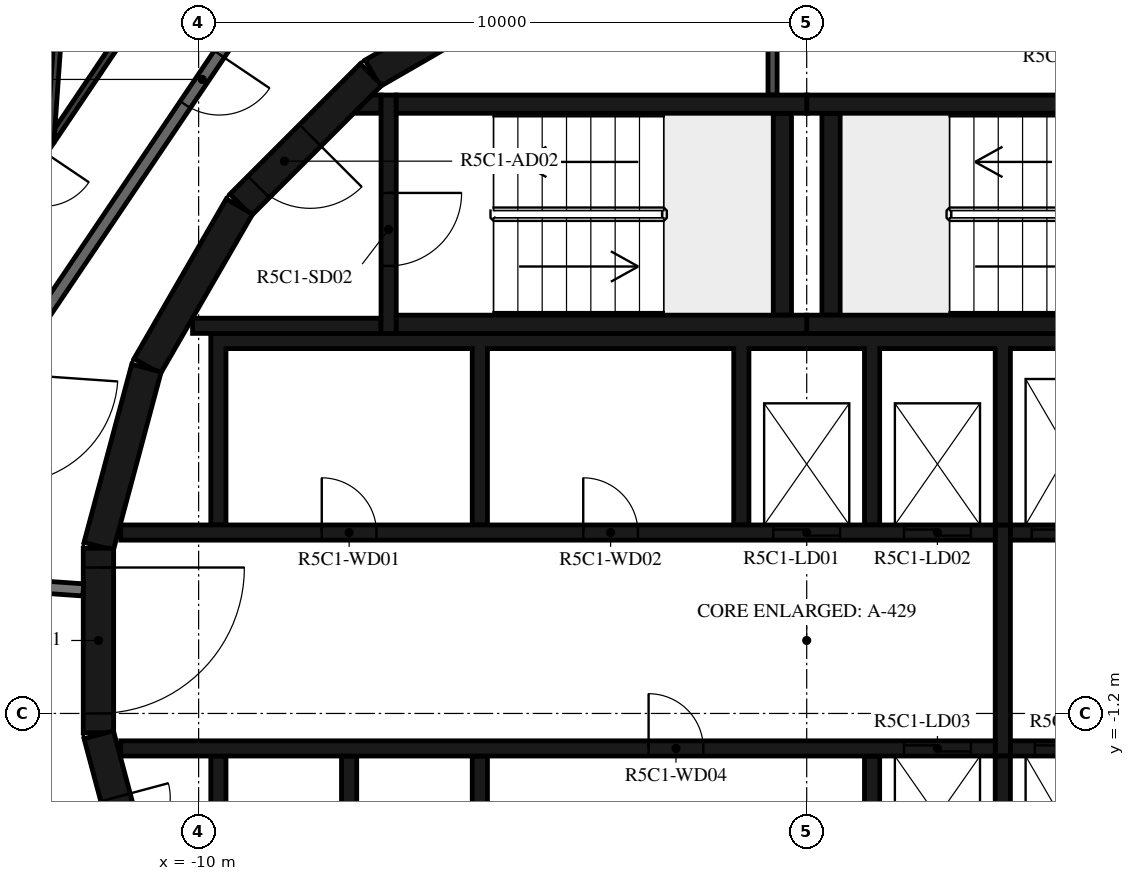
"""IFC4 building model, lengths in metres.
Left out: names, types, materials, properties, quantities, classifications, styles, units other than length and angle.
Written with IfcOpenShell. Run it as: python <this file> out.ifc"""

import sys

from ifc_helpers import new_model, si_unit, direction, frame, frame_2d, origin, place, context, subcontext, project, spatial, polyline, rectangle, outline, extrude, element, fill, save


model = new_model("IFC4")
c1 = context("Model", 3, precision=1e-05, world=origin(), true_north=direction((0.0, 1.0)))
c2 = subcontext(c1, "Body", "Model", "MODEL_VIEW")
j1 = project(units=[si_unit("LENGTHUNIT", "METRE"), si_unit("PLANEANGLEUNIT", "RADIAN")], contexts=[c1])
p1 = place(None, origin())
s1 = spatial("IfcSite", under=j1, at=p1, CompositionType="ELEMENT")
p2 = place(p1, origin())
s2 = spatial("IfcBuilding", under=s1, at=p2, CompositionType="ELEMENT")
p3 = place(p2, frame((0.0, 0.0, 212.9)))
s3 = spatial("IfcBuildingStorey", under=s2, at=p3, CompositionType="ELEMENT", Elevation=212.9)
p4 = place(p3, frame((-4.51, 10.845, 0.0), z_axis=(0.0, 0.0, 1.0), x_axis=(-0.865975092491, -0.500087131594, 0.0)))
e1 = element("IfcWall", 1, at=p4, inside=s3, PredefinedType="SHEAR", context=c2, shape_type="SweptSolid", body=[
    extrude(rectangle(XDim=3.033, YDim=0.5, at=frame_2d((1.516, 0.0))), origin(), (0.0, 0.0, 1.0), 3.12),
])
p5 = place(p3, frame((-7.164, 9.308, 0.0), z_axis=(0.0, 0.0, 1.0), x_axis=(-0.707106781187, -0.707106781187, 0.0)))
e2 = element("IfcWall", 2, at=p5, inside=s3, PredefinedType="SHEAR", context=c2, shape_type="SweptSolid", body=[
    extrude(rectangle(XDim=3.032, YDim=0.5, at=frame_2d((1.516, 0.0))), origin(), (0.0, 0.0, 1.0), 3.12),
])
p6 = place(p5, frame((1.416, 0.0, 0.0)))
e3 = element("IfcOpeningElement", 3, at=p6, cuts=e2, PredefinedType="OPENING", context=c2, shape_type="SweptSolid", body=[
    extrude(rectangle(XDim=1.2, YDim=2.1, at=frame_2d((0.6, 1.05))), frame((0.0, 0.26, 0.0), z_axis=(0.0, -1.0, 0.0), x_axis=(1.0, 0.0, 0.0)), (0.0, 0.0, 1.0), 0.52),
])
for number, where, z_axis, x_axis in (
    (4, (-9.329, 7.137, 0.0), (0.0, 0.0, 1.0), (-0.5, -0.866, 0.0)),
    (5, (-10.858, 4.479, 0.0), (0.0, 0.0, 1.0), (-0.259, -0.966, 0.0)),
):
    element("IfcWall", number, at=place(p3, frame(where, z_axis=z_axis, x_axis=x_axis)), inside=s3, PredefinedType="SHEAR", context=c2, shape_type="SweptSolid", body=[
        extrude(rectangle(XDim=3.033, YDim=0.5, at=frame_2d((1.516, 0.0))), origin(), (0.0, 0.0, 1.0), 3.12),
    ])
p7 = place(p3, frame((-11.647, 1.516, 0.0), z_axis=(0.0, 0.0, 1.0), x_axis=(0.0, -1.0, 0.0)))
e6 = element("IfcWall", 6, at=p7, inside=s3, PredefinedType="SHEAR", context=c2, shape_type="SweptSolid", body=[
    extrude(rectangle(XDim=3.033, YDim=0.5, at=frame_2d((1.516, 0.0))), origin(), (0.0, 0.0, 1.0), 3.12),
])
p8 = place(p7, frame((0.316, 0.0, 0.0)))
e7 = element("IfcOpeningElement", 7, at=p8, cuts=e6, PredefinedType="OPENING", context=c2, shape_type="SweptSolid", body=[
    extrude(rectangle(XDim=2.4, YDim=2.1, at=frame_2d((1.2, 1.05))), frame((0.0, 0.26, 0.0), z_axis=(0.0, -1.0, 0.0), x_axis=(1.0, 0.0, 0.0)), (0.0, 0.0, 1.0), 0.52),
])
p9 = place(p3, frame((-11.643, -1.55, 0.0), z_axis=(0.0, 0.0, 1.0), x_axis=(0.258734743916, -0.965948410781, 0.0)))
e8 = element("IfcWall", 8, at=p9, inside=s3, PredefinedType="SHEAR", context=c2, shape_type="SweptSolid", body=[
    extrude(rectangle(XDim=3.033, YDim=0.5, at=frame_2d((1.516, 0.0))), origin(), (0.0, 0.0, 1.0), 3.12),
])
p10 = place(p9, frame((1.066, 0.0, 0.0)))
e9 = element("IfcOpeningElement", 9, at=p10, cuts=e8, PredefinedType="OPENING", context=c2, shape_type="SweptSolid", body=[
    extrude(rectangle(XDim=0.9, YDim=2.1, at=frame_2d((0.45, 1.05))), frame((0.0, 0.26, 0.0), z_axis=(0.0, -1.0, 0.0), x_axis=(1.0, 0.0, 0.0)), (0.0, 0.0, 1.0), 0.52),
])
for number, where, z_axis, x_axis in (
    (10, (0.0, 5.2, 0.0), (0.0, 0.0, 1.0), (1.0, 0.0, 0.0)),
    (11, (0.0, 8.82, 0.0), (0.0, 0.0, 1.0), (1.0, 0.0, 0.0)),
):
    element("IfcWall", number, at=place(p3, frame(where, z_axis=z_axis, x_axis=x_axis)), inside=s3, PredefinedType="SHEAR", context=c2, shape_type="SweptSolid", body=[
        extrude(rectangle(XDim=6.75, YDim=0.3, at=frame_2d((3.375, 0.0))), origin(), (0.0, 0.0, 1.0), 3.12),
    ])
p11 = place(p3, frame((0.4, 5.35, 0.0), z_axis=(0.0, 0.0, 1.0), x_axis=(0.0, 1.0, 0.0)))
e12 = element("IfcWall", 12, at=p11, inside=s3, PredefinedType="SHEAR", context=c2, shape_type="SweptSolid", body=[
    extrude(rectangle(XDim=3.32, YDim=0.3, at=frame_2d((1.66, 0.0))), origin(), (0.0, 0.0, 1.0), 3.12),
])
for number, where, z_axis, x_axis in (
    (13, (-6.75, 5.2, 0.0), (0.0, 0.0, 1.0), (1.0, 0.0, 0.0)),
    (14, (-6.75, 8.82, 0.0), (0.0, 0.0, 1.0), (1.0, 0.0, 0.0)),
):
    element("IfcWall", number, at=place(p3, frame(where, z_axis=z_axis, x_axis=x_axis)), inside=s3, PredefinedType="SHEAR", context=c2, shape_type="SweptSolid", body=[
        extrude(rectangle(XDim=6.75, YDim=0.3, at=frame_2d((3.375, 0.0))), origin(), (0.0, 0.0, 1.0), 3.12),
    ])
p12 = place(p3, frame((-0.4, 5.35, 0.0), z_axis=(0.0, 0.0, 1.0), x_axis=(0.0, 1.0, 0.0)))
e15 = element("IfcWall", 15, at=p12, inside=s3, PredefinedType="SHEAR", context=c2, shape_type="SweptSolid", body=[
    extrude(rectangle(XDim=3.32, YDim=0.3, at=frame_2d((1.66, 0.0))), origin(), (0.0, 0.0, 1.0), 3.12),
])
p13 = place(p3, frame((-6.875, 8.97, 0.0), z_axis=(0.0, 0.0, 1.0), x_axis=(0.0, -1.0, 0.0)))
e16 = element("IfcWall", 16, at=p13, inside=s3, PredefinedType="SHEAR", context=c2, shape_type="SweptSolid", body=[
    extrude(rectangle(XDim=3.92, YDim=0.25, at=frame_2d((1.96, 0.0))), origin(), (0.0, 0.0, 1.0), 3.12),
])
p14 = place(p13, frame((1.61, 0.0, 0.0)))
e17 = element("IfcOpeningElement", 17, at=p14, cuts=e16, PredefinedType="OPENING", context=c2, shape_type="SweptSolid", body=[
    extrude(rectangle(XDim=1.2, YDim=2.1, at=frame_2d((0.6, 1.05))), frame((0.0, 0.135, 0.0), z_axis=(0.0, -1.0, 0.0), x_axis=(1.0, 0.0, 0.0)), (0.0, 0.0, 1.0), 0.27),
])
p15 = place(p3, frame((-7.0, 5.175, 0.0), z_axis=(0.0, 0.0, 1.0), x_axis=(-1.0, 0.0, 0.0)))
e18 = element("IfcWall", 18, at=p15, inside=s3, PredefinedType="SHEAR", context=c2, shape_type="SweptSolid", body=[
    extrude(rectangle(XDim=3.1, YDim=0.25, at=frame_2d((1.55, 0.0))), origin(), (0.0, 0.0, 1.0), 3.12),
])
p16 = place(p3, origin())
e19 = element("IfcWall", 19, at=p16, inside=s3, PredefinedType="SHEAR", context=c2, shape_type="SweptSolid", body=[
    extrude(outline(polyline([(-7.148, 8.97), (-7.0, 8.97), (-7.0, 8.67), (-7.448, 8.67), (-7.148, 8.97)])), origin(), (0.0, 0.0, 1.0), 3.12),
])
p17 = place(p3, origin())
e20 = element("IfcWall", 20, at=p17, inside=s3, PredefinedType="SHEAR", context=c2, shape_type="SweptSolid", body=[
    extrude(outline(polyline([(-9.55, 4.8), (-5.5, 4.8), (-5.5, 1.9), (-5.25, 1.9), (-5.25, 4.8), (-1.2, 4.8), (-1.2, 1.9), (-0.95, 1.9), (-0.95, 4.8), (0.95, 4.8), (0.95, 1.9), (1.2, 1.9), (1.2, 4.8), (3.1, 4.8), (3.1, 1.9), (3.35, 1.9), (3.35, 4.8), (5.25, 4.8), (5.25, 1.9), (5.5, 1.9), (5.5, 4.8), (7.4, 4.8), (7.4, 1.9), (7.65, 1.9), (7.65, 4.8), (9.55, 4.8), (9.55, 1.9), (9.8, 1.9), (9.8, 4.8), (9.8, 5.05), (-9.8, 5.05), (-9.8, 4.8), (-9.8, 1.9), (-9.55, 1.9), (-9.55, 4.8)])), origin(), (0.0, 0.0, 1.0), 3.12),
])
p18 = place(p3, origin())
e21 = element("IfcWall", 21, at=p18, inside=s3, PredefinedType="SHEAR", context=c2, shape_type="SweptSolid", body=[
    extrude(outline(polyline([(9.8, -5.05), (9.8, -4.8), (9.8, -1.9), (9.55, -1.9), (9.55, -4.8), (7.65, -4.8), (7.65, -1.9), (7.4, -1.9), (7.4, -4.8), (5.5, -4.8), (5.5, -1.9), (5.25, -1.9), (5.25, -4.8), (3.35, -4.8), (3.35, -1.9), (3.1, -1.9), (3.1, -4.8), (1.2, -4.8), (1.2, -1.9), (0.95, -1.9), (0.95, -4.8), (-5.25, -4.8), (-5.25, -1.9), (-5.5, -1.9), (-5.5, -4.8), (-7.4, -4.8), (-7.4, -1.9), (-7.65, -1.9), (-7.65, -4.8), (-9.55, -4.8), (-9.55, -1.9), (-9.8, -1.9), (-9.8, -4.8), (-9.8, -5.05), (9.8, -5.05)])), origin(), (0.0, 0.0, 1.0), 3.12),
])
p19 = place(p3, frame((-11.28, 1.775, 0.0), z_axis=(0.0, 0.0, 1.0), x_axis=(1.0, 0.0, 0.0)))
e22 = element("IfcWall", 22, at=p19, inside=s3, PredefinedType="SHEAR", context=c2, shape_type="SweptSolid", body=[
    extrude(rectangle(XDim=14.38, YDim=0.25, at=frame_2d((7.19, 0.0))), origin(), (0.0, 0.0, 1.0), 3.12),
])
p20 = place(p19, frame((10.73, 0.0, 0.0)))
e23 = element("IfcOpeningElement", 23, at=p20, cuts=e22, PredefinedType="OPENING", context=c2, shape_type="SweptSolid", body=[
    extrude(rectangle(XDim=1.1, YDim=2.1, at=frame_2d((0.55, 1.05))), frame((0.0, 0.135, 0.0), z_axis=(0.0, -1.0, 0.0), x_axis=(1.0, 0.0, 0.0)), (0.0, 0.0, 1.0), 0.27),
])
p21 = place(p19, frame((12.88, 0.0, 0.0)))
e24 = element("IfcOpeningElement", 24, at=p21, cuts=e22, PredefinedType="OPENING", context=c2, shape_type="SweptSolid", body=[
    extrude(rectangle(XDim=1.1, YDim=2.1, at=frame_2d((0.55, 1.05))), frame((0.0, 0.135, 0.0), z_axis=(0.0, -1.0, 0.0), x_axis=(1.0, 0.0, 0.0)), (0.0, 0.0, 1.0), 0.27),
])
p22 = place(p19, frame((3.305, 0.0, 0.0)))
e25 = element("IfcOpeningElement", 25, at=p22, cuts=e22, PredefinedType="OPENING", context=c2, shape_type="SweptSolid", body=[
    extrude(rectangle(XDim=0.9, YDim=2.1, at=frame_2d((0.45, 1.05))), frame((0.0, 0.135, 0.0), z_axis=(0.0, -1.0, 0.0), x_axis=(1.0, 0.0, 0.0)), (0.0, 0.0, 1.0), 0.27),
])
p23 = place(p19, frame((7.605, 0.0, 0.0)))
e26 = element("IfcOpeningElement", 26, at=p23, cuts=e22, PredefinedType="OPENING", context=c2, shape_type="SweptSolid", body=[
    extrude(rectangle(XDim=0.9, YDim=2.1, at=frame_2d((0.45, 1.05))), frame((0.0, 0.135, 0.0), z_axis=(0.0, -1.0, 0.0), x_axis=(1.0, 0.0, 0.0)), (0.0, 0.0, 1.0), 0.27),
])
p24 = place(p3, frame((3.35, 1.775, 0.0), z_axis=(0.0, 0.0, 1.0), x_axis=(1.0, 0.0, 0.0)))
e27 = element("IfcWall", 27, at=p24, inside=s3, PredefinedType="SHEAR", context=c2, shape_type="SweptSolid", body=[
    extrude(rectangle(XDim=7.93, YDim=0.25, at=frame_2d((3.965, 0.0))), origin(), (0.0, 0.0, 1.0), 3.12),
])
p25 = place(p24, frame((0.35, 0.0, 0.0)))
e28 = element("IfcOpeningElement", 28, at=p25, cuts=e27, PredefinedType="OPENING", context=c2, shape_type="SweptSolid", body=[
    extrude(rectangle(XDim=1.2, YDim=2.4, at=frame_2d((0.6, 1.2))), frame((0.0, 0.135, 0.0), z_axis=(0.0, -1.0, 0.0), x_axis=(1.0, 0.0, 0.0)), (0.0, 0.0, 1.0), 0.27),
])
p26 = place(p24, frame((2.5, 0.0, 0.0)))
e29 = element("IfcOpeningElement", 29, at=p26, cuts=e27, PredefinedType="OPENING", context=c2, shape_type="SweptSolid", body=[
    extrude(rectangle(XDim=1.2, YDim=2.4, at=frame_2d((0.6, 1.2))), frame((0.0, 0.135, 0.0), z_axis=(0.0, -1.0, 0.0), x_axis=(1.0, 0.0, 0.0)), (0.0, 0.0, 1.0), 0.27),
])
p27 = place(p24, frame((4.8, 0.0, 0.0)))
e30 = element("IfcOpeningElement", 30, at=p27, cuts=e27, PredefinedType="OPENING", context=c2, shape_type="SweptSolid", body=[
    extrude(rectangle(XDim=0.9, YDim=2.1, at=frame_2d((0.45, 1.05))), frame((0.0, 0.135, 0.0), z_axis=(0.0, -1.0, 0.0), x_axis=(1.0, 0.0, 0.0)), (0.0, 0.0, 1.0), 0.27),
])
p28 = place(p3, frame((-11.28, -1.775, 0.0), z_axis=(0.0, 0.0, 1.0), x_axis=(1.0, 0.0, 0.0)))
e31 = element("IfcWall", 31, at=p28, inside=s3, PredefinedType="SHEAR", context=c2, shape_type="SweptSolid", body=[
    extrude(rectangle(XDim=14.38, YDim=0.25, at=frame_2d((7.19, 0.0))), origin(), (0.0, 0.0, 1.0), 3.12),
])
p29 = place(p28, frame((12.88, 0.0, 0.0)))
e32 = element("IfcOpeningElement", 32, at=p29, cuts=e31, PredefinedType="OPENING", context=c2, shape_type="SweptSolid", body=[
    extrude(rectangle(XDim=1.1, YDim=2.1, at=frame_2d((0.55, 1.05))), frame((0.0, 0.135, 0.0), z_axis=(0.0, -1.0, 0.0), x_axis=(1.0, 0.0, 0.0)), (0.0, 0.0, 1.0), 0.27),
])
p30 = place(p28, frame((8.68, 0.0, 0.0)))
e33 = element("IfcOpeningElement", 33, at=p30, cuts=e31, PredefinedType="OPENING", context=c2, shape_type="SweptSolid", body=[
    extrude(rectangle(XDim=0.9, YDim=2.1, at=frame_2d((0.45, 1.05))), frame((0.0, 0.135, 0.0), z_axis=(0.0, -1.0, 0.0), x_axis=(1.0, 0.0, 0.0)), (0.0, 0.0, 1.0), 0.27),
])
p31 = place(p3, frame((3.35, -1.775, 0.0), z_axis=(0.0, 0.0, 1.0), x_axis=(1.0, 0.0, 0.0)))
e34 = element("IfcWall", 34, at=p31, inside=s3, PredefinedType="SHEAR", context=c2, shape_type="SweptSolid", body=[
    extrude(rectangle(XDim=7.93, YDim=0.25, at=frame_2d((3.965, 0.0))), origin(), (0.0, 0.0, 1.0), 3.12),
])
p32 = place(p31, frame((0.4, 0.0, 0.0)))
e35 = element("IfcOpeningElement", 35, at=p32, cuts=e34, PredefinedType="OPENING", context=c2, shape_type="SweptSolid", body=[
    extrude(rectangle(XDim=1.1, YDim=2.4, at=frame_2d((0.55, 1.2))), frame((0.0, 0.135, 0.0), z_axis=(0.0, -1.0, 0.0), x_axis=(1.0, 0.0, 0.0)), (0.0, 0.0, 1.0), 0.27),
])
p33 = place(p31, frame((2.55, 0.0, 0.0)))
e36 = element("IfcOpeningElement", 36, at=p33, cuts=e34, PredefinedType="OPENING", context=c2, shape_type="SweptSolid", body=[
    extrude(rectangle(XDim=1.1, YDim=2.4, at=frame_2d((0.55, 1.2))), frame((0.0, 0.135, 0.0), z_axis=(0.0, -1.0, 0.0), x_axis=(1.0, 0.0, 0.0)), (0.0, 0.0, 1.0), 0.27),
])
p34 = place(p31, frame((4.7, 0.0, 0.0)))
e37 = element("IfcOpeningElement", 37, at=p34, cuts=e34, PredefinedType="OPENING", context=c2, shape_type="SweptSolid", body=[
    extrude(rectangle(XDim=1.1, YDim=2.4, at=frame_2d((0.55, 1.2))), frame((0.0, 0.135, 0.0), z_axis=(0.0, -1.0, 0.0), x_axis=(1.0, 0.0, 0.0)), (0.0, 0.0, 1.0), 0.27),
])
p35 = place(p3, frame((3.225, -1.9, 0.0), z_axis=(0.0, 0.0, 1.0), x_axis=(0.0, 1.0, 0.0)))
e38 = element("IfcWall", 38, at=p35, inside=s3, PredefinedType="SHEAR", context=c2, shape_type="SweptSolid", body=[
    extrude(rectangle(XDim=3.8, YDim=0.25, at=frame_2d((1.9, 0.0))), origin(), (0.0, 0.0, 1.0), 3.12),
])
p36 = place(p3, frame((-0.562, 8.97, 0.0), z_axis=(0.0, 0.0, 1.0), x_axis=(0.0, 1.0, 0.0)))
e39 = element("IfcWall", 39, at=p36, inside=s3, PredefinedType="PARTITIONING", context=c2, shape_type="SweptSolid", body=[
    extrude(rectangle(XDim=2.427, YDim=0.15, at=frame_2d((1.214, 0.0))), origin(), (0.0, 0.0, 1.0), 3.12),
])
p37 = place(p36, frame((0.764, 0.0, 0.0)))
e40 = element("IfcOpeningElement", 40, at=p37, cuts=e39, PredefinedType="OPENING", context=c2, shape_type="SweptSolid", body=[
    extrude(rectangle(XDim=0.9, YDim=2.1, at=frame_2d((0.45, 1.05))), frame((0.0, 0.085, 0.0), z_axis=(0.0, -1.0, 0.0), x_axis=(1.0, 0.0, 0.0)), (0.0, 0.0, 1.0), 0.17),
])
p38 = place(p3, frame((-13.367, 0.935, 0.0), z_axis=(0.0, 0.0, 1.0), x_axis=(0.997553656289, -0.069904955655, 0.0)))
e41 = element("IfcWall", 41, at=p38, inside=s3, PredefinedType="STANDARD", context=c2, shape_type="SweptSolid", body=[
    extrude(rectangle(XDim=1.474, YDim=0.2, at=frame_2d((0.737, 0.0))), origin(), (0.0, 0.0, 1.0), 3.12),
])
p39 = place(p3, frame((-9.101, 10.47, 0.0), z_axis=(0.0, 0.0, 1.0), x_axis=(-0.559195469534, -0.829035841718, 0.0)))
e42 = element("IfcWall", 42, at=p39, inside=s3, PredefinedType="STANDARD", context=c2, shape_type="SweptSolid", body=[
    extrude(rectangle(XDim=7.181, YDim=0.2, at=frame_2d((3.591, 0.0))), origin(), (0.0, 0.0, 1.0), 3.12),
])
p40 = place(p39, frame((1.0, 0.0, 0.0)))
e43 = element("IfcOpeningElement", 43, at=p40, cuts=e42, PredefinedType="OPENING", context=c2, shape_type="SweptSolid", body=[
    extrude(rectangle(XDim=1.0, YDim=2.1, at=frame_2d((0.5, 1.05))), frame((0.0, 0.11, 0.0), z_axis=(0.0, -1.0, 0.0), x_axis=(1.0, 0.0, 0.0)), (0.0, 0.0, 1.0), 0.22),
])
p41 = place(p3, frame((-10.12, 11.642, 0.0), z_axis=(0.0, 0.0, 1.0), x_axis=(-0.55920080659, -0.829032241779, 0.0)))
e44 = element("IfcWall", 44, at=p41, inside=s3, PredefinedType="PARTITIONING", context=c2, shape_type="SweptSolid", body=[
    extrude(rectangle(XDim=7.985, YDim=0.12, at=frame_2d((3.992, 0.0))), origin(), (0.0, 0.0, 1.0), 3.12),
])
p42 = place(p41, frame((4.346, 0.0, 0.0)))
e45 = element("IfcOpeningElement", 45, at=p42, cuts=e44, PredefinedType="OPENING", context=c2, shape_type="SweptSolid", body=[
    extrude(rectangle(XDim=0.9, YDim=2.1, at=frame_2d((0.45, 1.05))), frame((0.0, 0.07, 0.0), z_axis=(0.0, -1.0, 0.0), x_axis=(1.0, 0.0, 0.0)), (0.0, 0.0, 1.0), 0.14),
])
p43 = place(p3, frame((-12.439, 8.204, 0.0), z_axis=(0.0, 0.0, 1.0), x_axis=(0.069750037523, 0.997564500303, 0.0)))
e46 = element("IfcWall", 46, at=p43, inside=s3, PredefinedType="PARTITIONING", context=c2, shape_type="SweptSolid", body=[
    extrude(rectangle(XDim=10.014, YDim=0.12, at=frame_2d((5.007, 0.0))), origin(), (0.0, 0.0, 1.0), 3.12),
])
p44 = place(p43, frame((1.859, 0.0, 0.0)))
e47 = element("IfcOpeningElement", 47, at=p44, cuts=e46, PredefinedType="OPENING", context=c2, shape_type="SweptSolid", body=[
    extrude(rectangle(XDim=0.9, YDim=2.1, at=frame_2d((0.45, 1.05))), frame((0.0, 0.07, 0.0), z_axis=(0.0, -1.0, 0.0), x_axis=(1.0, 0.0, 0.0)), (0.0, 0.0, 1.0), 0.14),
])
p45 = place(p14, origin())
e48 = element("IfcDoor", 48, at=p45, inside=s3, OperationType="SINGLE_SWING_LEFT", PredefinedType="DOOR", context=c2, shape_type="SweptSolid", body=[
    extrude(rectangle(XDim=1.2, YDim=2.1, at=frame_2d((0.6, 1.05))), frame((0.0, 0.025, 0.0), z_axis=(0.0, -1.0, 0.0), x_axis=(1.0, 0.0, 0.0)), (0.0, 0.0, 1.0), 0.05),
])
fill(e17, e48)
p46 = place(p6, origin())
e49 = element("IfcDoor", 49, at=p46, inside=s3, OperationType="SINGLE_SWING_RIGHT", PredefinedType="DOOR", context=c2, shape_type="SweptSolid", body=[
    extrude(rectangle(XDim=1.2, YDim=2.1, at=frame_2d((0.6, 1.05))), frame((0.0, 0.025, 0.0), z_axis=(0.0, -1.0, 0.0), x_axis=(1.0, 0.0, 0.0)), (0.0, 0.0, 1.0), 0.05),
])
fill(e3, e49)
p47 = place(p8, origin())
e50 = element("IfcDoor", 50, at=p47, inside=s3, OperationType="DOUBLE_DOOR_SINGLE_SWING", PredefinedType="DOOR", context=c2, shape_type="SweptSolid", body=[
    extrude(rectangle(XDim=2.4, YDim=2.1, at=frame_2d((1.2, 1.05))), frame((0.0, 0.025, 0.0), z_axis=(0.0, -1.0, 0.0), x_axis=(1.0, 0.0, 0.0)), (0.0, 0.0, 1.0), 0.05),
])
fill(e7, e50)
p48 = place(p20, origin())
e51 = element("IfcDoor", 51, at=p48, inside=s3, OperationType="DOUBLE_DOOR_SLIDING", PredefinedType="DOOR", context=c2, shape_type="SweptSolid", body=[
    extrude(rectangle(XDim=1.1, YDim=2.1, at=frame_2d((0.55, 1.05))), frame((0.0, 0.025, 0.0), z_axis=(0.0, -1.0, 0.0), x_axis=(1.0, 0.0, 0.0)), (0.0, 0.0, 1.0), 0.05),
])
fill(e23, e51)
p49 = place(p21, origin())
e52 = element("IfcDoor", 52, at=p49, inside=s3, OperationType="DOUBLE_DOOR_SLIDING", PredefinedType="DOOR", context=c2, shape_type="SweptSolid", body=[
    extrude(rectangle(XDim=1.1, YDim=2.1, at=frame_2d((0.55, 1.05))), frame((0.0, 0.025, 0.0), z_axis=(0.0, -1.0, 0.0), x_axis=(1.0, 0.0, 0.0)), (0.0, 0.0, 1.0), 0.05),
])
fill(e24, e52)
p50 = place(p25, origin())
e53 = element("IfcDoor", 53, at=p50, inside=s3, OperationType="DOUBLE_DOOR_SLIDING", PredefinedType="DOOR", context=c2, shape_type="SweptSolid", body=[
    extrude(rectangle(XDim=1.2, YDim=2.4, at=frame_2d((0.6, 1.2))), frame((0.0, 0.025, 0.0), z_axis=(0.0, -1.0, 0.0), x_axis=(1.0, 0.0, 0.0)), (0.0, 0.0, 1.0), 0.05),
])
fill(e28, e53)
p51 = place(p29, origin())
e54 = element("IfcDoor", 54, at=p51, inside=s3, OperationType="DOUBLE_DOOR_SLIDING", PredefinedType="DOOR", context=c2, shape_type="SweptSolid", body=[
    extrude(rectangle(XDim=1.1, YDim=2.1, at=frame_2d((0.55, 1.05))), frame((0.0, 0.025, 0.0), z_axis=(0.0, -1.0, 0.0), x_axis=(1.0, 0.0, 0.0)), (0.0, 0.0, 1.0), 0.05),
])
fill(e32, e54)
p52 = place(p32, origin())
e55 = element("IfcDoor", 55, at=p52, inside=s3, OperationType="DOUBLE_DOOR_SLIDING", PredefinedType="DOOR", context=c2, shape_type="SweptSolid", body=[
    extrude(rectangle(XDim=1.1, YDim=2.4, at=frame_2d((0.55, 1.2))), frame((0.0, 0.025, 0.0), z_axis=(0.0, -1.0, 0.0), x_axis=(1.0, 0.0, 0.0)), (0.0, 0.0, 1.0), 0.05),
])
fill(e35, e55)
p53 = place(p22, origin())
e56 = element("IfcDoor", 56, at=p53, inside=s3, OperationType="SINGLE_SWING_LEFT", PredefinedType="DOOR", context=c2, shape_type="SweptSolid", body=[
    extrude(rectangle(XDim=0.9, YDim=2.1, at=frame_2d((0.45, 1.05))), frame((0.0, 0.025, 0.0), z_axis=(0.0, -1.0, 0.0), x_axis=(1.0, 0.0, 0.0)), (0.0, 0.0, 1.0), 0.05),
])
fill(e25, e56)
p54 = place(p23, origin())
e57 = element("IfcDoor", 57, at=p54, inside=s3, OperationType="SINGLE_SWING_RIGHT", PredefinedType="DOOR", context=c2, shape_type="SweptSolid", body=[
    extrude(rectangle(XDim=0.9, YDim=2.1, at=frame_2d((0.45, 1.05))), frame((0.0, 0.025, 0.0), z_axis=(0.0, -1.0, 0.0), x_axis=(1.0, 0.0, 0.0)), (0.0, 0.0, 1.0), 0.05),
])
fill(e26, e57)
p55 = place(p30, origin())
e58 = element("IfcDoor", 58, at=p55, inside=s3, OperationType="SINGLE_SWING_RIGHT", PredefinedType="DOOR", context=c2, shape_type="SweptSolid", body=[
    extrude(rectangle(XDim=0.9, YDim=2.1, at=frame_2d((0.45, 1.05))), frame((0.0, 0.025, 0.0), z_axis=(0.0, -1.0, 0.0), x_axis=(1.0, 0.0, 0.0)), (0.0, 0.0, 1.0), 0.05),
])
fill(e33, e58)
p56 = place(p10, origin())
e59 = element("IfcDoor", 59, at=p56, inside=s3, OperationType="SINGLE_SWING_LEFT", PredefinedType="DOOR", context=c2, shape_type="SweptSolid", body=[
    extrude(rectangle(XDim=0.9, YDim=2.1, at=frame_2d((0.45, 1.05))), frame((0.0, 0.025, 0.0), z_axis=(0.0, -1.0, 0.0), x_axis=(1.0, 0.0, 0.0)), (0.0, 0.0, 1.0), 0.05),
])
fill(e9, e59)
p57 = place(p40, origin())
e60 = element("IfcDoor", 60, at=p57, inside=s3, OperationType="SINGLE_SWING_LEFT", PredefinedType="DOOR", context=c2, shape_type="SweptSolid", body=[
    extrude(rectangle(XDim=1.0, YDim=2.1, at=frame_2d((0.5, 1.05))), frame((0.0, 0.025, 0.0), z_axis=(0.0, -1.0, 0.0), x_axis=(1.0, 0.0, 0.0)), (0.0, 0.0, 1.0), 0.05),
])
fill(e43, e60)
save(model, sys.argv[1])
